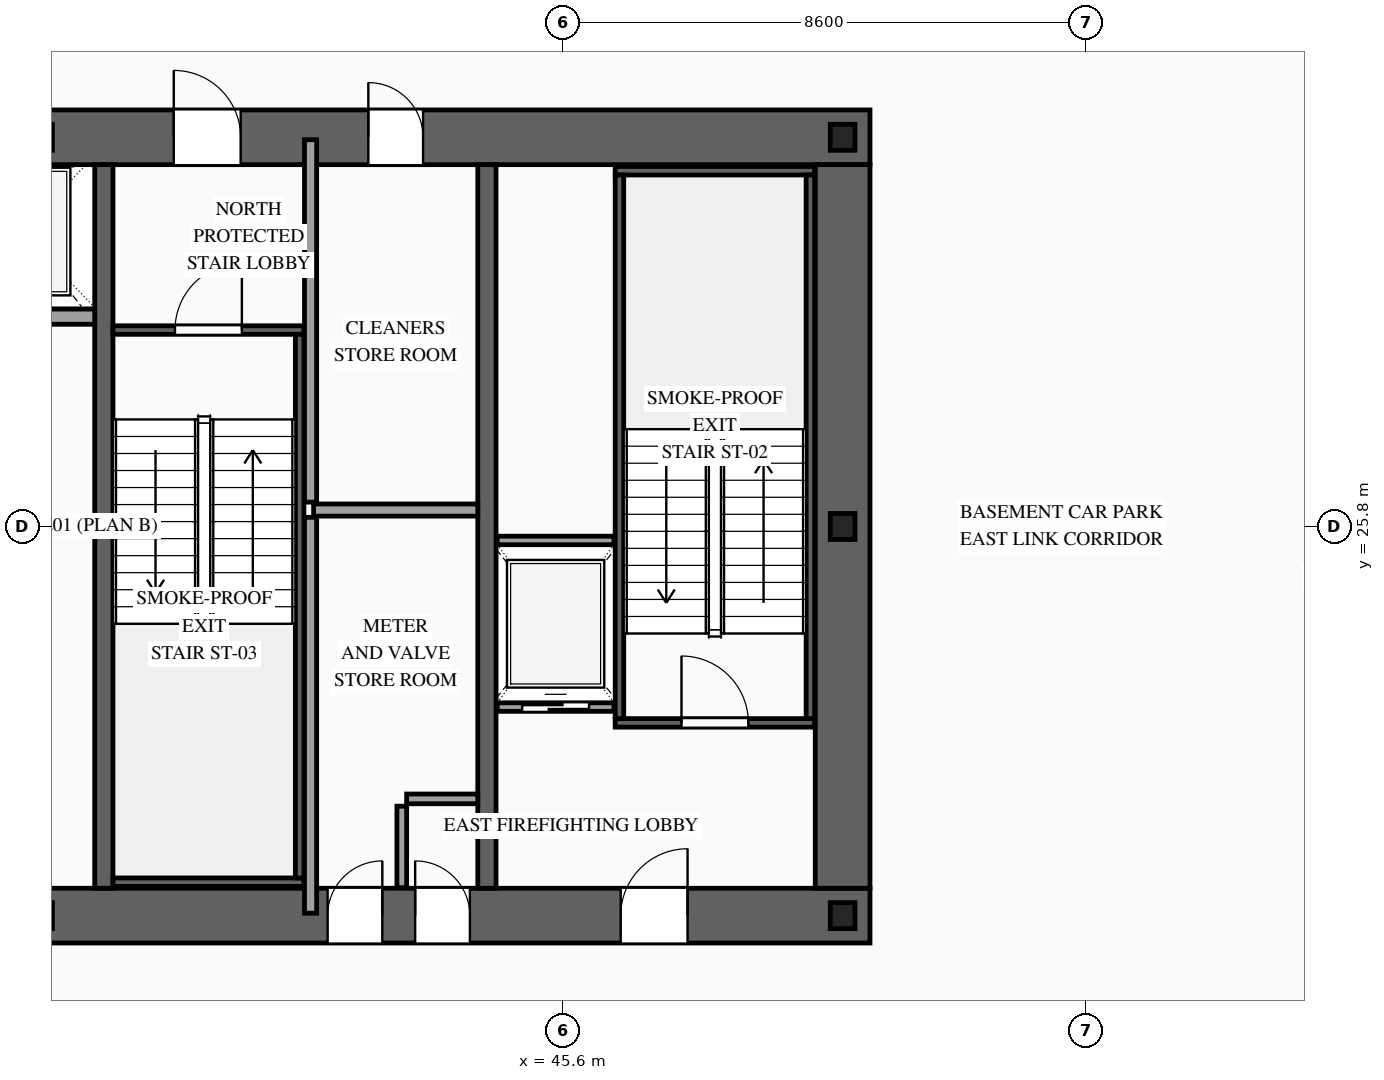
"""IFC4 building model, lengths in metres.
Left out: names, types, materials, properties, quantities, classifications, styles, units other than length and angle.
Written with IfcOpenShell. Run it as: python <this file> out.ifc"""

import sys

from ifc_helpers import new_model, si_unit, direction, frame, frame_2d, origin, origin_2d, place, context, subcontext, project, spatial, rectangle, i_section, extrude, source, transform, mapped, element, fill, save


model = new_model("IFC4")
c1 = context("Model", 3, precision=1e-05, world=origin(), true_north=direction((0.0, 1.0)))
c2 = subcontext(c1, "Body", "Model", "MODEL_VIEW")
j1 = project(units=[si_unit("LENGTHUNIT", "METRE"), si_unit("PLANEANGLEUNIT", "RADIAN")], contexts=[c1])
p1 = place(None, origin())
s1 = spatial("IfcSite", under=j1, at=p1, CompositionType="ELEMENT")
p2 = place(p1, origin())
s2 = spatial("IfcBuilding", under=s1, at=p2, CompositionType="ELEMENT")
p3 = place(p2, frame((0.0, 0.0, -4.5)))
s3 = spatial("IfcBuildingStorey", under=s2, at=p3, CompositionType="ELEMENT", Elevation=-4.5)
p4 = place(p3, frame((23.35, 19.4, 0.0), z_axis=(0.0, 0.0, 1.0), x_axis=(1.0, 0.0, 0.0)))
e1 = element("IfcWall", 1, at=p4, inside=s3, PredefinedType="SHEAR", context=c2, shape_type="SweptSolid", body=[
    extrude(rectangle(XDim=27.3, YDim=0.9, at=frame_2d((13.65, 0.0))), origin(), (0.0, 0.0, 1.0), 4.5),
])
p5 = place(p4, frame((2.1, 0.0, 0.0)))
e2 = element("IfcOpeningElement", 2, at=p5, cuts=e1, PredefinedType="OPENING", context=c2, shape_type="SweptSolid", body=[
    extrude(rectangle(XDim=1.1, YDim=2.2, at=frame_2d((0.55, 1.1))), frame((0.0, 0.465, 0.0), z_axis=(0.0, -1.0, 0.0), x_axis=(1.0, 0.0, 0.0)), (0.0, 0.0, 1.0), 0.93),
])
p6 = place(p4, frame((10.0, 0.0, 0.0)))
e3 = element("IfcOpeningElement", 3, at=p6, cuts=e1, PredefinedType="OPENING", context=c2, shape_type="SweptSolid", body=[
    extrude(rectangle(XDim=1.1, YDim=2.2, at=frame_2d((0.55, 1.1))), frame((0.0, 0.465, 0.0), z_axis=(0.0, -1.0, 0.0), x_axis=(1.0, 0.0, 0.0)), (0.0, 0.0, 1.0), 0.93),
])
p7 = place(p4, frame((23.2, 0.0, 0.0)))
e4 = element("IfcOpeningElement", 4, at=p7, cuts=e1, PredefinedType="OPENING", context=c2, shape_type="SweptSolid", body=[
    extrude(rectangle(XDim=1.1, YDim=2.2, at=frame_2d((0.55, 1.1))), frame((0.0, 0.465, 0.0), z_axis=(0.0, -1.0, 0.0), x_axis=(1.0, 0.0, 0.0)), (0.0, 0.0, 1.0), 0.93),
])
p8 = place(p4, frame((19.82, 0.0, 0.0)))
e5 = element("IfcOpeningElement", 5, at=p8, cuts=e1, PredefinedType="OPENING", context=c2, shape_type="SweptSolid", body=[
    extrude(rectangle(XDim=0.9, YDim=2.15, at=frame_2d((0.45, 1.075))), frame((0.0, 0.465, 0.0), z_axis=(0.0, -1.0, 0.0), x_axis=(1.0, 0.0, 0.0)), (0.0, 0.0, 1.0), 0.93),
])
p9 = place(p4, frame((18.38, 0.0, 0.0)))
e6 = element("IfcOpeningElement", 6, at=p9, cuts=e1, PredefinedType="OPENING", context=c2, shape_type="SweptSolid", body=[
    extrude(rectangle(XDim=0.9, YDim=2.15, at=frame_2d((0.45, 1.075))), frame((0.0, 0.465, 0.0), z_axis=(0.0, -1.0, 0.0), x_axis=(1.0, 0.0, 0.0)), (0.0, 0.0, 1.0), 0.93),
])
p10 = place(p3, frame((23.35, 32.2, 0.0), z_axis=(0.0, 0.0, 1.0), x_axis=(1.0, 0.0, 0.0)))
e7 = element("IfcWall", 7, at=p10, inside=s3, PredefinedType="SHEAR", context=c2, shape_type="SweptSolid", body=[
    extrude(rectangle(XDim=27.3, YDim=0.9, at=frame_2d((13.65, 0.0))), origin(), (0.0, 0.0, 1.0), 4.5),
])
p11 = place(p10, frame((4.72, 0.0, 0.0)))
e8 = element("IfcOpeningElement", 8, at=p11, cuts=e7, PredefinedType="OPENING", context=c2, shape_type="SweptSolid", body=[
    extrude(rectangle(XDim=0.9, YDim=2.15, at=frame_2d((0.45, 1.075))), frame((0.0, 0.465, 0.0), z_axis=(0.0, -1.0, 0.0), x_axis=(1.0, 0.0, 0.0)), (0.0, 0.0, 1.0), 0.93),
])
p12 = place(p10, frame((10.0, 0.0, 0.0)))
e9 = element("IfcOpeningElement", 9, at=p12, cuts=e7, PredefinedType="OPENING", context=c2, shape_type="SweptSolid", body=[
    extrude(rectangle(XDim=1.1, YDim=2.2, at=frame_2d((0.55, 1.1))), frame((0.0, 0.465, 0.0), z_axis=(0.0, -1.0, 0.0), x_axis=(1.0, 0.0, 0.0)), (0.0, 0.0, 1.0), 0.93),
])
p13 = place(p10, frame((15.85, 0.0, 0.0)))
e10 = element("IfcOpeningElement", 10, at=p13, cuts=e7, PredefinedType="OPENING", context=c2, shape_type="SweptSolid", body=[
    extrude(rectangle(XDim=1.1, YDim=2.2, at=frame_2d((0.55, 1.1))), frame((0.0, 0.465, 0.0), z_axis=(0.0, -1.0, 0.0), x_axis=(1.0, 0.0, 0.0)), (0.0, 0.0, 1.0), 0.93),
])
p14 = place(p10, frame((19.05, 0.0, 0.0)))
e11 = element("IfcOpeningElement", 11, at=p14, cuts=e7, PredefinedType="OPENING", context=c2, shape_type="SweptSolid", body=[
    extrude(rectangle(XDim=0.9, YDim=2.15, at=frame_2d((0.45, 1.075))), frame((0.0, 0.465, 0.0), z_axis=(0.0, -1.0, 0.0), x_axis=(1.0, 0.0, 0.0)), (0.0, 0.0, 1.0), 0.93),
])
m1 = source(origin(), c2, "Body", "SweptSolid", [
    extrude(rectangle(XDim=11.9, YDim=0.9, at=frame_2d((5.95, 0.0))), origin(), (0.0, 0.0, 1.0), 4.5),
])
p15 = place(p3, frame((50.2, 19.85, 0.0), z_axis=(0.0, 0.0, 1.0), x_axis=(0.0, 1.0, 0.0)))
e12 = element("IfcWall", 12, at=p15, inside=s3, PredefinedType="SHEAR", context=c2, shape_type="MappedRepresentation", body=[
    mapped(m1, transform((0.0, 0.0, 0.0), scale=1.0)),
])
m2 = source(origin(), c2, "Body", "SweptSolid", [
    extrude(rectangle(XDim=11.9, YDim=0.3, at=frame_2d((5.95, 0.0))), origin(), (0.0, 0.0, 1.0), 4.5),
])
for number, where, z_axis, x_axis in (
    (13, (38.05, 19.85, 0.0), (0.0, 0.0, 1.0), (0.0, 1.0, 0.0)),
    (14, (44.35, 19.85, 0.0), (0.0, 0.0, 1.0), (0.0, 1.0, 0.0)),
):
    element("IfcWall", number, at=place(p3, frame(where, z_axis=z_axis, x_axis=x_axis)), inside=s3, PredefinedType="SOLIDWALL", context=c2, shape_type="MappedRepresentation", body=[
        mapped(m2, transform((0.0, 0.0, 0.0), scale=1.0)),
    ])
m3 = source(origin(), c2, "Body", "SweptSolid", [
    extrude(i_section(OverallWidth=0.407, OverallDepth=0.428, WebThickness=0.02, FlangeThickness=0.035, at=origin_2d()), origin(), (0.0, 0.0, 1.0), 4.5),
])
for number, where, z_axis, x_axis in (
    (15, (37.0, 19.4, 0.0), (0.0, 0.0, 1.0), (1.0, 0.0, 0.0)),
    (16, (50.2, 19.4, 0.0), (0.0, 0.0, 1.0), (1.0, 0.0, 0.0)),
    (17, (50.2, 25.8, 0.0), (0.0, 0.0, 1.0), (1.0, 0.0, 0.0)),
    (18, (37.0, 32.2, 0.0), (0.0, 0.0, 1.0), (1.0, 0.0, 0.0)),
    (19, (50.2, 32.2, 0.0), (0.0, 0.0, 1.0), (1.0, 0.0, 0.0)),
):
    element("IfcColumn", number, at=place(p3, frame(where, z_axis=z_axis, x_axis=x_axis)), inside=s3, PredefinedType="COLUMN", context=c2, shape_type="MappedRepresentation", body=[
        mapped(m3, transform((0.0, 0.0, 0.0), scale=1.0)),
    ])
p16 = place(p3, frame((44.52, 22.83, 0.0), z_axis=(0.0, 0.0, 1.0), x_axis=(1.0, 0.0, 0.0)))
e20 = element("IfcWall", 20, at=p16, inside=s3, PredefinedType="SOLIDWALL", context=c2, shape_type="SweptSolid", body=[
    extrude(rectangle(XDim=1.92, YDim=0.14, at=frame_2d((0.96, 0.0))), origin(), (0.0, 0.0, 1.0), 4.2),
])
p17 = place(p16, frame((0.41, 0.0, 0.0)))
e21 = element("IfcOpeningElement", 21, at=p17, cuts=e20, PredefinedType="OPENING", context=c2, shape_type="SweptSolid", body=[
    extrude(rectangle(XDim=1.1, YDim=2.2, at=frame_2d((0.55, 1.1))), frame((0.0, 0.085, 0.0), z_axis=(0.0, -1.0, 0.0), x_axis=(1.0, 0.0, 0.0)), (0.0, 0.0, 1.0), 0.17),
])
m4 = source(origin(), c2, "Body", "SweptSolid", [
    extrude(rectangle(XDim=1.92, YDim=0.14, at=frame_2d((0.96, 0.0))), origin(), (0.0, 0.0, 1.0), 4.2),
])
p18 = place(p3, frame((44.52, 25.57, 0.0), z_axis=(0.0, 0.0, 1.0), x_axis=(1.0, 0.0, 0.0)))
e22 = element("IfcWall", 22, at=p18, inside=s3, PredefinedType="SOLIDWALL", context=c2, shape_type="MappedRepresentation", body=[
    mapped(m4, transform((0.0, 0.0, 0.0), scale=1.0)),
])
m5 = source(origin(), c2, "Body", "SweptSolid", [
    extrude(rectangle(XDim=2.4, YDim=0.25, at=frame_2d((1.2, 0.0))), origin(), (0.0, 0.0, 1.0), 4.2),
])
p19 = place(p3, frame((35.5, 29.25, 0.0), z_axis=(0.0, 0.0, 1.0), x_axis=(1.0, 0.0, 0.0)))
e23 = element("IfcWall", 23, at=p19, inside=s3, PredefinedType="SOLIDWALL", context=c2, shape_type="MappedRepresentation", body=[
    mapped(m5, transform((0.0, 0.0, 0.0), scale=1.0)),
])
p20 = place(p3, frame((46.46, 22.57, 0.0), z_axis=(0.0, 0.0, 1.0), x_axis=(1.0, 0.0, 0.0)))
e24 = element("IfcWall", 24, at=p20, inside=s3, PredefinedType="SOLIDWALL", context=c2, shape_type="SweptSolid", body=[
    extrude(rectangle(XDim=3.28, YDim=0.14, at=frame_2d((1.64, 0.0))), origin(), (0.0, 0.0, 1.0), 4.2),
])
p21 = place(p20, frame((1.09, 0.0, 0.0)))
e25 = element("IfcOpeningElement", 25, at=p21, cuts=e24, PredefinedType="OPENING", context=c2, shape_type="SweptSolid", body=[
    extrude(rectangle(XDim=1.1, YDim=2.2, at=frame_2d((0.55, 1.1))), frame((0.0, 0.085, 0.0), z_axis=(0.0, -1.0, 0.0), x_axis=(1.0, 0.0, 0.0)), (0.0, 0.0, 1.0), 0.17),
])
m6 = source(origin(), c2, "Body", "SweptSolid", [
    extrude(rectangle(XDim=3.28, YDim=0.14, at=frame_2d((1.64, 0.0))), origin(), (0.0, 0.0, 1.0), 4.2),
])
p22 = place(p3, frame((46.46, 31.65, 0.0), z_axis=(0.0, 0.0, 1.0), x_axis=(1.0, 0.0, 0.0)))
e26 = element("IfcWall", 26, at=p22, inside=s3, PredefinedType="SOLIDWALL", context=c2, shape_type="MappedRepresentation", body=[
    mapped(m6, transform((0.0, 0.0, 0.0), scale=1.0)),
])
m7 = source(origin(), c2, "Body", "SweptSolid", [
    extrude(rectangle(XDim=8.94, YDim=0.14, at=frame_2d((4.47, 0.0))), origin(), (0.0, 0.0, 1.0), 4.2),
])
for number, where, z_axis, x_axis in (
    (27, (46.53, 22.64, 0.0), (0.0, 0.0, 1.0), (0.0, 1.0, 0.0)),
    (28, (49.67, 22.64, 0.0), (0.0, 0.0, 1.0), (0.0, 1.0, 0.0)),
):
    element("IfcWall", number, at=place(p3, frame(where, z_axis=z_axis, x_axis=x_axis)), inside=s3, PredefinedType="SOLIDWALL", context=c2, shape_type="MappedRepresentation", body=[
        mapped(m7, transform((0.0, 0.0, 0.0), scale=1.0)),
    ])
p23 = place(p3, frame((38.2, 29.03, 0.0), z_axis=(0.0, 0.0, 1.0), x_axis=(1.0, 0.0, 0.0)))
e29 = element("IfcWall", 29, at=p23, inside=s3, PredefinedType="SOLIDWALL", context=c2, shape_type="SweptSolid", body=[
    extrude(rectangle(XDim=3.14, YDim=0.14, at=frame_2d((1.57, 0.0))), origin(), (0.0, 0.0, 1.0), 4.2),
])
p24 = place(p23, frame((1.02, 0.0, 0.0)))
e30 = element("IfcOpeningElement", 30, at=p24, cuts=e29, PredefinedType="OPENING", context=c2, shape_type="SweptSolid", body=[
    extrude(rectangle(XDim=1.1, YDim=2.2, at=frame_2d((0.55, 1.1))), frame((0.0, 0.085, 0.0), z_axis=(0.0, -1.0, 0.0), x_axis=(1.0, 0.0, 0.0)), (0.0, 0.0, 1.0), 0.17),
])
m8 = source(origin(), c2, "Body", "SweptSolid", [
    extrude(rectangle(XDim=3.14, YDim=0.14, at=frame_2d((1.57, 0.0))), origin(), (0.0, 0.0, 1.0), 4.2),
])
p25 = place(p3, frame((38.2, 19.95, 0.0), z_axis=(0.0, 0.0, 1.0), x_axis=(1.0, 0.0, 0.0)))
e31 = element("IfcWall", 31, at=p25, inside=s3, PredefinedType="SOLIDWALL", context=c2, shape_type="MappedRepresentation", body=[
    mapped(m8, transform((0.0, 0.0, 0.0), scale=1.0)),
])
m9 = source(origin(), c2, "Body", "SweptSolid", [
    extrude(rectangle(XDim=8.94, YDim=0.14, at=frame_2d((4.47, 0.0))), origin(), (0.0, 0.0, 1.0), 4.2),
])
p26 = place(p3, frame((41.27, 20.02, 0.0), z_axis=(0.0, 0.0, 1.0), x_axis=(0.0, 1.0, 0.0)))
e32 = element("IfcWall", 32, at=p26, inside=s3, PredefinedType="SOLIDWALL", context=c2, shape_type="MappedRepresentation", body=[
    mapped(m9, transform((0.0, 0.0, 0.0), scale=1.0)),
])
m10 = source(origin(), c2, "Body", "SweptSolid", [
    extrude(rectangle(XDim=1.34, YDim=0.16, at=frame_2d((0.67, 0.0))), origin(), (0.0, 0.0, 1.0), 4.2),
])
p27 = place(p3, frame((42.95, 19.86, 0.0), z_axis=(0.0, 0.0, 1.0), x_axis=(0.0, 1.0, 0.0)))
e33 = element("IfcWall", 33, at=p27, inside=s3, PredefinedType="PARTITIONING", context=c2, shape_type="MappedRepresentation", body=[
    mapped(m10, transform((0.0, 0.0, 0.0), scale=1.0)),
])
m11 = source(origin(), c2, "Body", "SweptSolid", [
    extrude(rectangle(XDim=1.17, YDim=0.16, at=frame_2d((0.585, 0.0))), origin(), (0.0, 0.0, 1.0), 4.2),
])
p28 = place(p3, frame((43.03, 21.32, 0.0), z_axis=(0.0, 0.0, 1.0), x_axis=(1.0, 0.0, 0.0)))
e34 = element("IfcWall", 34, at=p28, inside=s3, PredefinedType="PARTITIONING", context=c2, shape_type="MappedRepresentation", body=[
    mapped(m11, transform((0.0, 0.0, 0.0), scale=1.0)),
])
m12 = source(origin(), c2, "Body", "SweptSolid", [
    extrude(rectangle(XDim=6.51, YDim=0.2, at=frame_2d((3.255, 0.0))), origin(), (0.0, 0.0, 1.0), 4.2),
])
p29 = place(p3, frame((41.45, 19.44, 0.0), z_axis=(0.0, 0.0, 1.0), x_axis=(0.0, 1.0, 0.0)))
e35 = element("IfcWall", 35, at=p29, inside=s3, PredefinedType="PARTITIONING", context=c2, shape_type="MappedRepresentation", body=[
    mapped(m12, transform((0.0, 0.0, 0.0), scale=1.0)),
])
m13 = source(origin(), c2, "Body", "SweptSolid", [
    extrude(rectangle(XDim=2.7, YDim=0.2, at=frame_2d((1.35, 0.0))), origin(), (0.0, 0.0, 1.0), 4.2),
])
p30 = place(p3, frame((41.5, 26.07, 0.0), z_axis=(0.0, 0.0, 1.0), x_axis=(1.0, 0.0, 0.0)))
e36 = element("IfcWall", 36, at=p30, inside=s3, PredefinedType="PARTITIONING", context=c2, shape_type="MappedRepresentation", body=[
    mapped(m13, transform((0.0, 0.0, 0.0), scale=1.0)),
])
m14 = source(origin(), c2, "Body", "SweptSolid", [
    extrude(rectangle(XDim=5.96, YDim=0.2, at=frame_2d((2.98, 0.0))), origin(), (0.0, 0.0, 1.0), 4.2),
])
p31 = place(p3, frame((41.45, 26.2, 0.0), z_axis=(0.0, 0.0, 1.0), x_axis=(0.0, 1.0, 0.0)))
e37 = element("IfcWall", 37, at=p31, inside=s3, PredefinedType="PARTITIONING", context=c2, shape_type="MappedRepresentation", body=[
    mapped(m14, transform((0.0, 0.0, 0.0), scale=1.0)),
])
m15 = source(origin(), c2, "Body", "SweptSolid", [
    extrude(rectangle(XDim=1.1, YDim=2.2, at=frame_2d((0.55, 1.1))), frame((0.0, 0.025, 0.0), z_axis=(0.0, -1.0, 0.0), x_axis=(1.0, 0.0, 0.0)), (0.0, 0.0, 1.0), 0.05),
])
p32 = place(p17, origin())
e38 = element("IfcDoor", 38, at=p32, inside=s3, OperationType="SLIDING_TO_RIGHT", PredefinedType="DOOR", context=c2, shape_type="MappedRepresentation", body=[
    mapped(m15, transform((0.0, 0.0, 0.0), scale=1.0)),
])
fill(e21, e38)
m16 = source(origin(), c2, "Body", "SweptSolid", [
    extrude(rectangle(XDim=1.1, YDim=2.2, at=frame_2d((0.55, 1.1))), frame((0.0, 0.025, 0.0), z_axis=(0.0, -1.0, 0.0), x_axis=(1.0, 0.0, 0.0)), (0.0, 0.0, 1.0), 0.05),
])
p33 = place(p21, origin())
e39 = element("IfcDoor", 39, at=p33, inside=s3, OperationType="SINGLE_SWING_LEFT", PredefinedType="DOOR", context=c2, shape_type="MappedRepresentation", body=[
    mapped(m16, transform((0.0, 0.0, 0.0), scale=1.0)),
])
fill(e25, e39)
p34 = place(p24, origin())
e40 = element("IfcDoor", 40, at=p34, inside=s3, OperationType="SINGLE_SWING_RIGHT", PredefinedType="DOOR", context=c2, shape_type="MappedRepresentation", body=[
    mapped(m16, transform((0.0, 0.0, 0.0), scale=1.0)),
])
fill(e30, e40)
p35 = place(p7, origin())
e41 = element("IfcDoor", 41, at=p35, inside=s3, OperationType="SINGLE_SWING_RIGHT", PredefinedType="DOOR", context=c2, shape_type="MappedRepresentation", body=[
    mapped(m16, transform((0.0, 0.0, 0.0), scale=1.0)),
])
fill(e4, e41)
p36 = place(p13, origin())
e42 = element("IfcDoor", 42, at=p36, inside=s3, OperationType="SINGLE_SWING_LEFT", PredefinedType="DOOR", context=c2, shape_type="MappedRepresentation", body=[
    mapped(m16, transform((0.0, 0.0, 0.0), scale=1.0)),
])
fill(e10, e42)
m17 = source(origin(), c2, "Body", "SweptSolid", [
    extrude(rectangle(XDim=0.9, YDim=2.15, at=frame_2d((0.45, 1.075))), frame((0.0, 0.025, 0.0), z_axis=(0.0, -1.0, 0.0), x_axis=(1.0, 0.0, 0.0)), (0.0, 0.0, 1.0), 0.05),
])
p37 = place(p8, origin())
e43 = element("IfcDoor", 43, at=p37, inside=s3, OperationType="SINGLE_SWING_LEFT", PredefinedType="DOOR", context=c2, shape_type="MappedRepresentation", body=[
    mapped(m17, transform((0.0, 0.0, 0.0), scale=1.0)),
])
fill(e5, e43)
p38 = place(p9, origin())
e44 = element("IfcDoor", 44, at=p38, inside=s3, OperationType="SINGLE_SWING_RIGHT", PredefinedType="DOOR", context=c2, shape_type="MappedRepresentation", body=[
    mapped(m17, transform((0.0, 0.0, 0.0), scale=1.0)),
])
fill(e6, e44)
p39 = place(p14, origin())
e45 = element("IfcDoor", 45, at=p39, inside=s3, OperationType="SINGLE_SWING_LEFT", PredefinedType="DOOR", context=c2, shape_type="MappedRepresentation", body=[
    mapped(m17, transform((0.0, 0.0, 0.0), scale=1.0)),
])
fill(e11, e45)
save(model, sys.argv[1])
